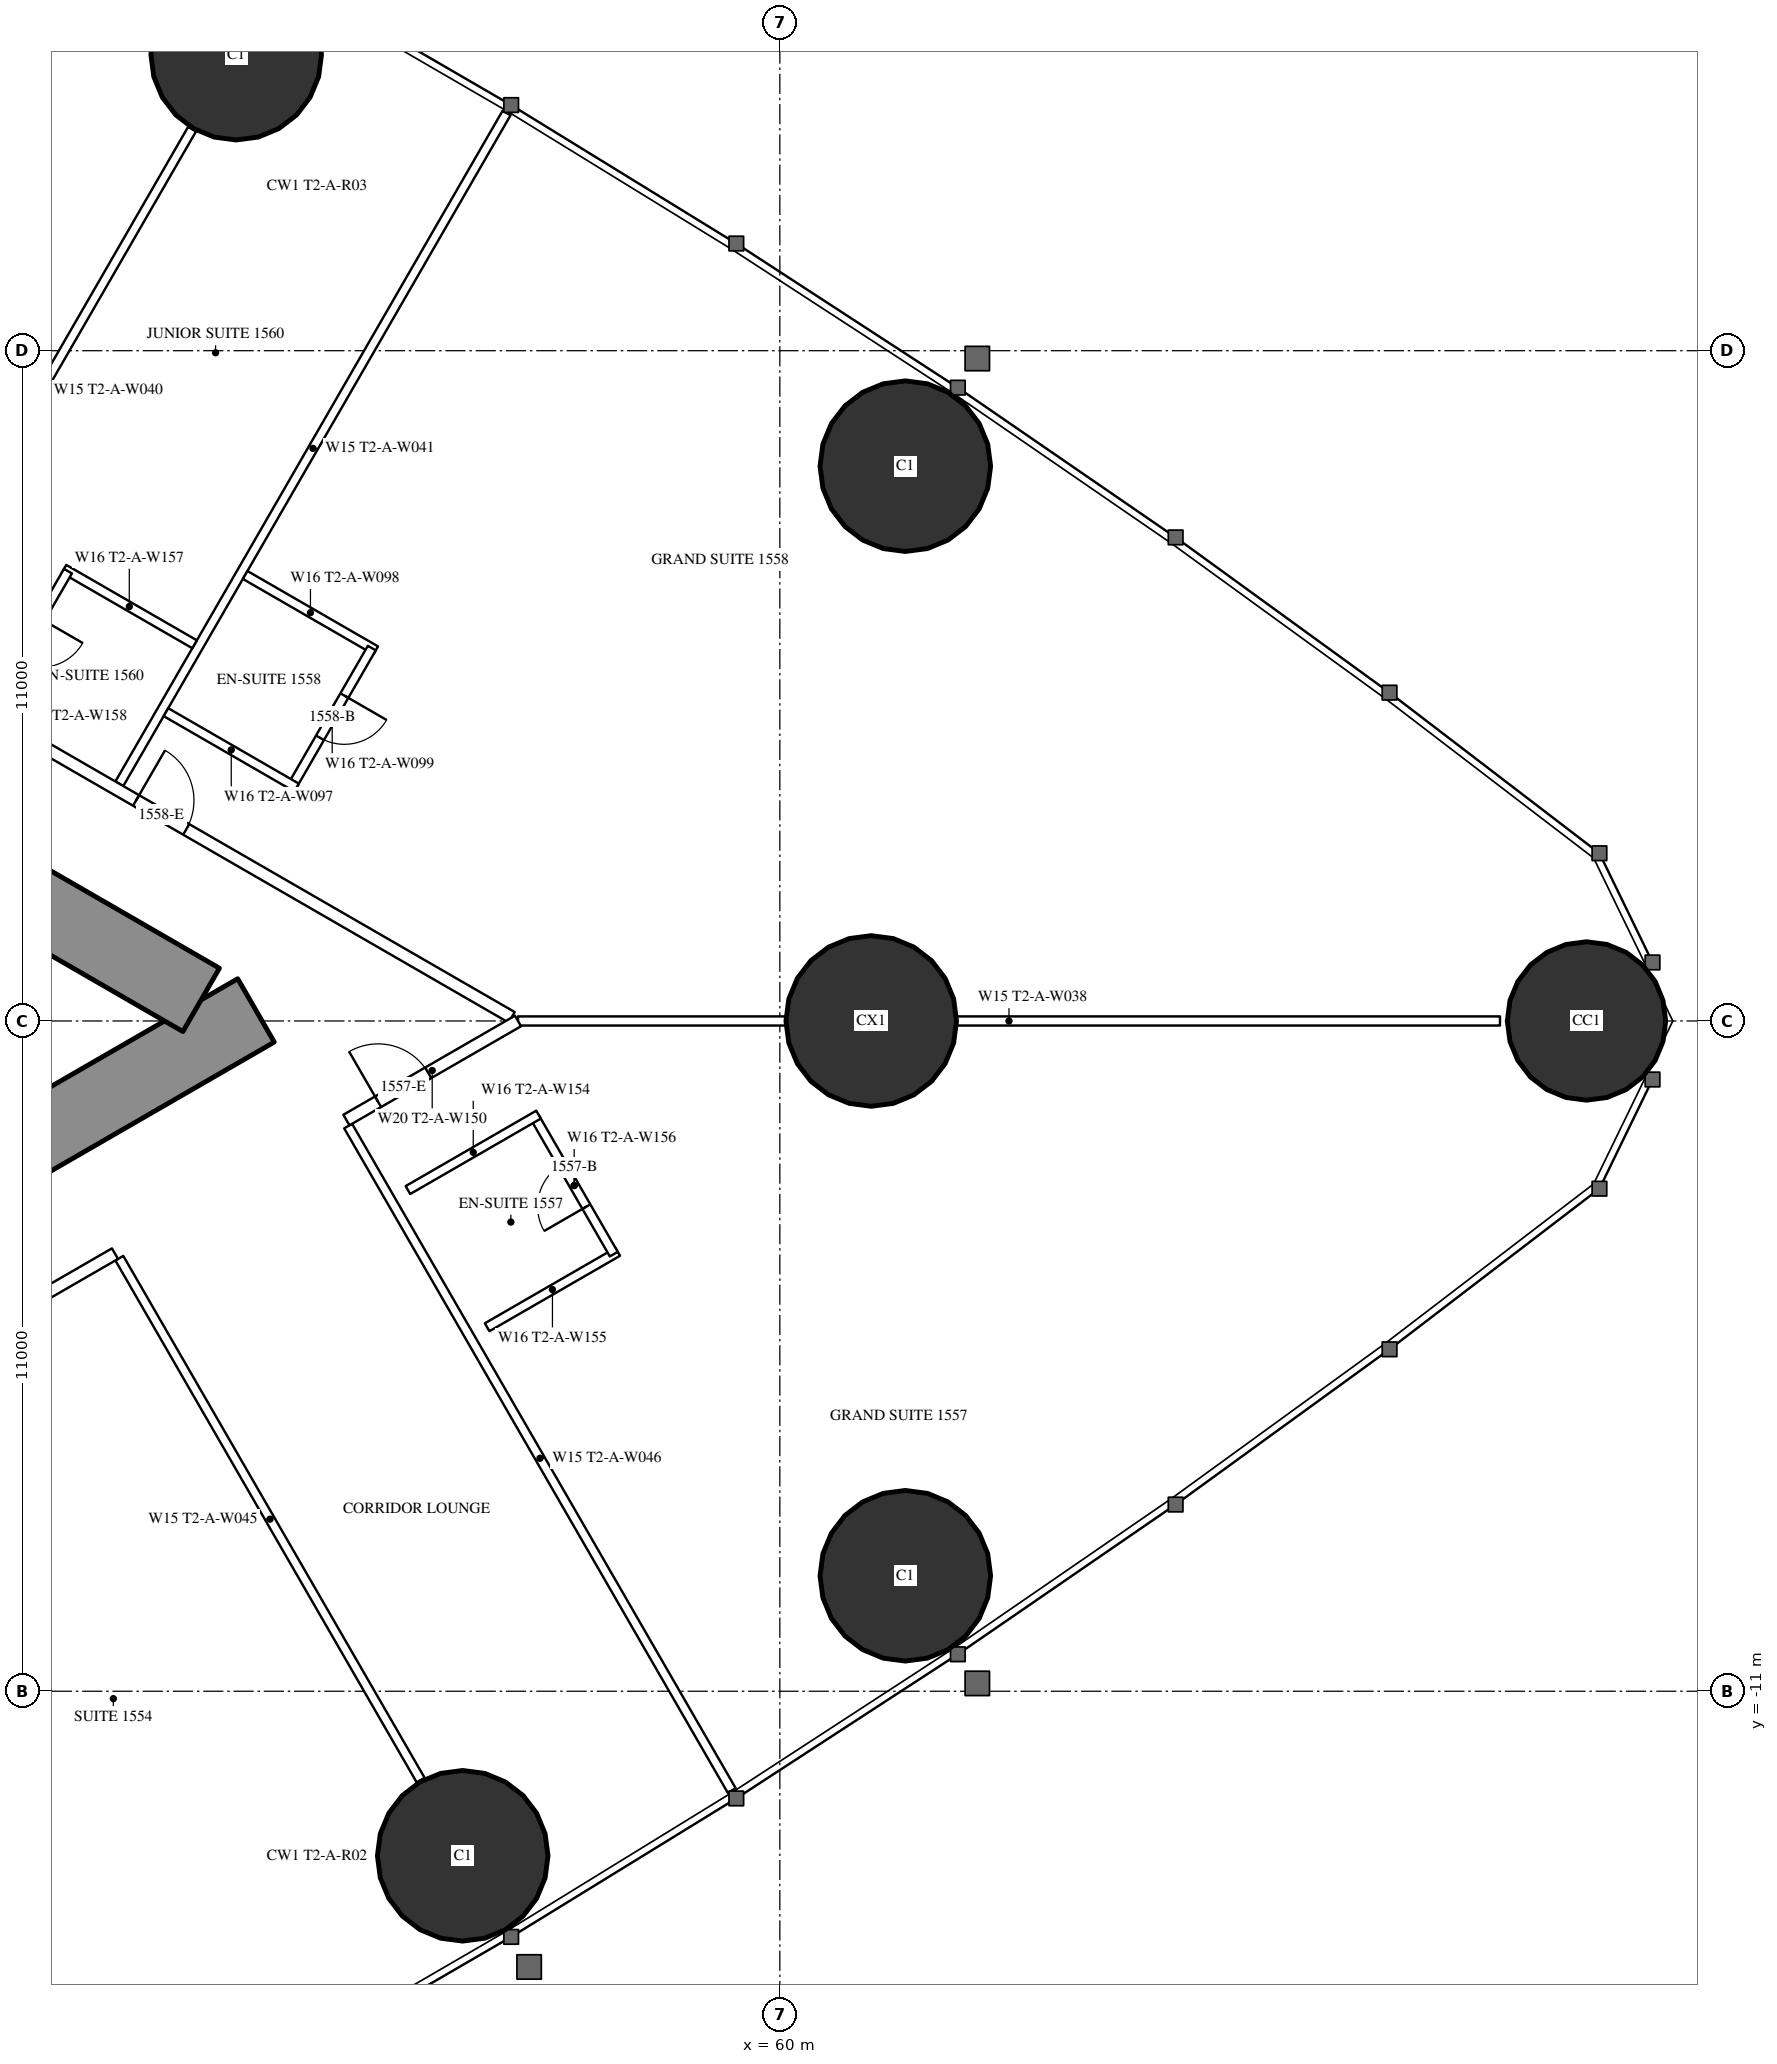
"""IFC4 building model, lengths in metres.
Left out: names, types, materials, properties, quantities, classifications, styles, units other than length and angle.
Written with IfcOpenShell. Run it as: python <this file> out.ifc"""

import sys

from ifc_helpers import new_model, si_unit, direction, frame, frame_2d, origin, origin_2d, place, context, subcontext, project, spatial, rectangle, hollow_circle, extrude, element, fill, save


model = new_model("IFC4")
c1 = context("Model", 3, precision=1e-05, world=origin(), true_north=direction((0.0, 1.0)))
c2 = subcontext(c1, "Body", "Model", "MODEL_VIEW")
j1 = project(units=[si_unit("LENGTHUNIT", "METRE"), si_unit("PLANEANGLEUNIT", "RADIAN")], contexts=[c1])
p1 = place(None, origin())
s1 = spatial("IfcSite", under=j1, at=p1, CompositionType="ELEMENT")
p2 = place(p1, origin())
s2 = spatial("IfcBuilding", under=s1, at=p2, CompositionType="ELEMENT")
p3 = place(p2, frame((0.0, 0.0, 60.0)))
s3 = spatial("IfcBuildingStorey", under=s2, at=p3, CompositionType="ELEMENT", Elevation=60.0)
p4 = place(p3, frame((73.239, 0.0, 0.0), z_axis=(0.0, 0.0, 1.0), x_axis=(1.0, 0.0, 0.0)))
e1 = element("IfcColumn", 1, at=p4, inside=s3, PredefinedType="COLUMN", context=c2, shape_type="SweptSolid", body=[
    extrude(hollow_circle(Radius=1.3, WallThickness=0.1, at=origin_2d()), origin(), (0.0, 0.0, 1.0), 3.5),
])
for number, where, z_axis, x_axis in (
    (2, (62.059, 9.105, 0.0), (0.0, 0.0, 1.0), (1.0, 0.0, 0.0)),
    (3, (51.078, 15.858, 0.0), (0.0, 0.0, 1.0), (1.0, 0.0, 0.0)),
    (4, (54.795, -13.701, 0.0), (0.0, 0.0, 1.0), (1.0, 0.0, 0.0)),
    (5, (62.059, -9.105, 0.0), (0.0, 0.0, 1.0), (1.0, 0.0, 0.0)),
):
    element("IfcColumn", number, at=place(p3, frame(where, z_axis=z_axis, x_axis=x_axis)), inside=s3, PredefinedType="COLUMN", context=c2, shape_type="SweptSolid", body=[
        extrude(hollow_circle(Radius=1.4, WallThickness=0.12, at=origin_2d()), origin(), (0.0, 0.0, 1.0), 3.5),
    ])
p5 = place(p3, frame((61.5, 0.0, 0.0), z_axis=(0.0, 0.0, 1.0), x_axis=(1.0, 0.0, 0.0)))
e6 = element("IfcColumn", 6, at=p5, inside=s3, PredefinedType="COLUMN", context=c2, shape_type="SweptSolid", body=[
    extrude(hollow_circle(Radius=1.4, WallThickness=0.1, at=origin_2d()), origin(), (0.0, 0.0, 1.0), 3.5),
])
p6 = place(p3, frame((27.2, -13.8, 0.0), z_axis=(0.0, 0.0, 1.0), x_axis=(0.866027159892, 0.499996958321, 0.0)))
e7 = element("IfcWall", 7, at=p6, inside=s3, PredefinedType="SHEAR", context=c2, shape_type="SweptSolid", body=[
    extrude(rectangle(XDim=27.947, YDim=1.2, at=frame_2d((13.973, 0.0))), origin(), (0.0, 0.0, 1.0), 3.5),
])
p7 = place(p6, frame((4.6, 0.0, 0.0)))
e8 = element("IfcOpeningElement", 8, at=p7, cuts=e7, PredefinedType="OPENING", context=c2, shape_type="SweptSolid", body=[
    extrude(rectangle(XDim=1.0, YDim=2.2, at=frame_2d((0.5, 1.1))), frame((0.0, 0.61, 0.0), z_axis=(0.0, -1.0, 0.0), x_axis=(1.0, 0.0, 0.0)), (0.0, 0.0, 1.0), 1.22),
])
p8 = place(p6, frame((13.395, 0.0, 0.0)))
e9 = element("IfcOpeningElement", 9, at=p8, cuts=e7, PredefinedType="OPENING", context=c2, shape_type="SweptSolid", body=[
    extrude(rectangle(XDim=1.8, YDim=2.2, at=frame_2d((0.9, 1.1))), frame((0.0, 0.61, 0.0), z_axis=(0.0, -1.0, 0.0), x_axis=(1.0, 0.0, 0.0)), (0.0, 0.0, 1.0), 1.22),
])
p9 = place(p3, frame((27.2, 13.8, 0.0), z_axis=(0.0, 0.0, 1.0), x_axis=(0.866024515034, -0.500001539357, 0.0)))
e10 = element("IfcWall", 10, at=p9, inside=s3, PredefinedType="SHEAR", context=c2, shape_type="SweptSolid", body=[
    extrude(rectangle(XDim=26.907, YDim=1.2, at=frame_2d((13.454, 0.0))), origin(), (0.0, 0.0, 1.0), 3.5),
])
p10 = place(p9, frame((4.6, 0.0, 0.0)))
e11 = element("IfcOpeningElement", 11, at=p10, cuts=e10, PredefinedType="OPENING", context=c2, shape_type="SweptSolid", body=[
    extrude(rectangle(XDim=1.0, YDim=2.2, at=frame_2d((0.5, 1.1))), frame((0.0, 0.61, 0.0), z_axis=(0.0, -1.0, 0.0), x_axis=(1.0, 0.0, 0.0)), (0.0, 0.0, 1.0), 1.22),
])
p11 = place(p9, frame((13.395, 0.0, 0.0)))
e12 = element("IfcOpeningElement", 12, at=p11, cuts=e10, PredefinedType="OPENING", context=c2, shape_type="SweptSolid", body=[
    extrude(rectangle(XDim=1.8, YDim=2.2, at=frame_2d((0.9, 1.1))), frame((0.0, 0.61, 0.0), z_axis=(0.0, -1.0, 0.0), x_axis=(1.0, 0.0, 0.0)), (0.0, 0.0, 1.0), 1.22),
])
p12 = place(p3, frame((49.159, -3.893, 0.0), z_axis=(0.0, 0.0, 1.0), x_axis=(0.499998773722, -0.866026111775, 0.0)))
e13 = element("IfcWall", 13, at=p12, inside=s3, PredefinedType="PARTITIONING", context=c2, shape_type="SweptSolid", body=[
    extrude(rectangle(XDim=9.892, YDim=0.15, at=frame_2d((4.946, 0.0))), origin(), (0.0, 0.0, 1.0), 2.25),
])
p13 = place(p3, frame((52.915, -1.725, 0.0), z_axis=(0.0, 0.0, 1.0), x_axis=(0.499997163113, -0.866027041656, 0.0)))
e14 = element("IfcWall", 14, at=p13, inside=s3, PredefinedType="PARTITIONING", context=c2, shape_type="SweptSolid", body=[
    extrude(rectangle(XDim=12.591, YDim=0.15, at=frame_2d((6.295, 0.0))), origin(), (0.0, 0.0, 1.0), 3.25),
])
p14 = place(p3, frame((45.403, 6.062, 0.0), z_axis=(0.0, 0.0, 1.0), x_axis=(0.500013434677, 0.866017647131, 0.0)))
e15 = element("IfcWall", 15, at=p14, inside=s3, PredefinedType="PARTITIONING", context=c2, shape_type="SweptSolid", body=[
    extrude(rectangle(XDim=9.902, YDim=0.15, at=frame_2d((4.951, 0.0))), origin(), (0.0, 0.0, 1.0), 2.25),
])
p15 = place(p3, frame((49.159, 3.893, 0.0), z_axis=(0.0, 0.0, 1.0), x_axis=(0.499995664361, 0.866027906952, 0.0)))
e16 = element("IfcWall", 16, at=p15, inside=s3, PredefinedType="PARTITIONING", context=c2, shape_type="SweptSolid", body=[
    extrude(rectangle(XDim=12.711, YDim=0.15, at=frame_2d((6.356, 0.0))), origin(), (0.0, 0.0, 1.0), 3.25),
])
p16 = place(p3, frame((55.702, 0.0, 0.0), z_axis=(0.0, 0.0, 1.0), x_axis=(1.0, 0.0, 0.0)))
e17 = element("IfcWall", 17, at=p16, inside=s3, PredefinedType="PARTITIONING", context=c2, shape_type="SweptSolid", body=[
    extrude(rectangle(XDim=16.117, YDim=0.15, at=frame_2d((8.059, 0.0))), origin(), (0.0, 0.0, 1.0), 2.25),
])
p17 = place(p3, frame((36.834, 10.894, 0.0), z_axis=(0.0, 0.0, 1.0), x_axis=(0.866028157229, -0.499995230863, 0.0)))
e18 = element("IfcWall", 18, at=p17, inside=s3, PredefinedType="PARTITIONING", context=c2, shape_type="SweptSolid", body=[
    extrude(rectangle(XDim=21.667, YDim=0.2, at=frame_2d((10.833, 0.0))), origin(), (0.0, 0.0, 1.0), 3.25),
])
p18 = place(p17, frame((14.55, 0.0, 0.0)))
e19 = element("IfcOpeningElement", 19, at=p18, cuts=e18, PredefinedType="OPENING", context=c2, shape_type="SweptSolid", body=[
    extrude(rectangle(XDim=0.95, YDim=2.2, at=frame_2d((0.475, 1.1))), frame((0.0, 0.11, 0.0), z_axis=(0.0, -1.0, 0.0), x_axis=(1.0, 0.0, 0.0)), (0.0, 0.0, 1.0), 0.22),
])
p19 = place(p17, frame((10.5, 0.0, 0.0)))
e20 = element("IfcOpeningElement", 20, at=p19, cuts=e18, PredefinedType="OPENING", context=c2, shape_type="SweptSolid", body=[
    extrude(rectangle(XDim=0.95, YDim=2.2, at=frame_2d((0.475, 1.1))), frame((0.0, 0.11, 0.0), z_axis=(0.0, -1.0, 0.0), x_axis=(1.0, 0.0, 0.0)), (0.0, 0.0, 1.0), 0.22),
])
p20 = place(p17, frame((4.292, 0.0, 0.0)))
e21 = element("IfcOpeningElement", 21, at=p20, cuts=e18, PredefinedType="OPENING", context=c2, shape_type="SweptSolid", body=[
    extrude(rectangle(XDim=1.0, YDim=2.2, at=frame_2d((0.5, 1.1))), frame((0.0, 0.11, 0.0), z_axis=(0.0, -1.0, 0.0), x_axis=(1.0, 0.0, 0.0)), (0.0, 0.0, 1.0), 0.22),
])
p21 = place(p17, frame((0.246, 0.0, 0.0)))
e22 = element("IfcOpeningElement", 22, at=p21, cuts=e18, PredefinedType="OPENING", context=c2, shape_type="SweptSolid", body=[
    extrude(rectangle(XDim=0.9, YDim=2.2, at=frame_2d((0.45, 1.1))), frame((0.0, 0.11, 0.0), z_axis=(0.0, -1.0, 0.0), x_axis=(1.0, 0.0, 0.0)), (0.0, 0.0, 1.0), 0.22),
])
p22 = place(p3, frame((37.96, -10.243, 0.0), z_axis=(0.0, 0.0, 1.0), x_axis=(0.866030548046, 0.499991089772, 0.0)))
e23 = element("IfcWall", 23, at=p22, inside=s3, PredefinedType="PARTITIONING", context=c2, shape_type="SweptSolid", body=[
    extrude(rectangle(XDim=12.849, YDim=0.2, at=frame_2d((6.425, 0.0))), origin(), (0.0, 0.0, 1.0), 3.25),
])
p23 = place(p22, frame((4.575, 0.0, 0.0)))
e24 = element("IfcOpeningElement", 24, at=p23, cuts=e23, PredefinedType="OPENING", context=c2, shape_type="SweptSolid", body=[
    extrude(rectangle(XDim=0.95, YDim=2.2, at=frame_2d((0.475, 1.1))), frame((0.0, 0.11, 0.0), z_axis=(0.0, -1.0, 0.0), x_axis=(1.0, 0.0, 0.0)), (0.0, 0.0, 1.0), 0.22),
])
p24 = place(p22, frame((0.6, 0.0, 0.0)))
e25 = element("IfcOpeningElement", 25, at=p24, cuts=e23, PredefinedType="OPENING", context=c2, shape_type="SweptSolid", body=[
    extrude(rectangle(XDim=0.95, YDim=2.2, at=frame_2d((0.475, 1.1))), frame((0.0, 0.11, 0.0), z_axis=(0.0, -1.0, 0.0), x_axis=(1.0, 0.0, 0.0)), (0.0, 0.0, 1.0), 0.22),
])
p25 = place(p3, frame((52.886, -1.626, 0.0), z_axis=(0.0, 0.0, 1.0), x_axis=(0.866030540913, 0.499991102127, 0.0)))
e26 = element("IfcWall", 26, at=p25, inside=s3, PredefinedType="PARTITIONING", context=c2, shape_type="SweptSolid", body=[
    extrude(rectangle(XDim=3.251, YDim=0.2, at=frame_2d((1.626, 0.0))), origin(), (0.0, 0.0, 1.0), 3.25),
])
p26 = place(p25, frame((0.6, 0.0, 0.0)))
e27 = element("IfcOpeningElement", 27, at=p26, cuts=e26, PredefinedType="OPENING", context=c2, shape_type="SweptSolid", body=[
    extrude(rectangle(XDim=0.95, YDim=2.2, at=frame_2d((0.475, 1.1))), frame((0.0, 0.11, 0.0), z_axis=(0.0, -1.0, 0.0), x_axis=(1.0, 0.0, 0.0)), (0.0, 0.0, 1.0), 0.22),
])
p27 = place(p3, frame((55.196, -5.026, 0.0), z_axis=(0.0, 0.0, 1.0), x_axis=(0.866073894602, 0.499916002032, 0.0)))
e28 = element("IfcWall", 28, at=p27, inside=s3, PredefinedType="PARTITIONING", context=c2, shape_type="SweptSolid", body=[
    extrude(rectangle(XDim=2.475, YDim=0.15, at=frame_2d((1.238, 0.0))), origin(), (0.0, 0.0, 1.0), 3.25),
])
p28 = place(p3, frame((55.975, -1.575, 0.0), z_axis=(0.0, 0.0, 1.0), x_axis=(0.500006934395, -0.866021400173, 0.0)))
e29 = element("IfcWall", 29, at=p28, inside=s3, PredefinedType="PARTITIONING", context=c2, shape_type="SweptSolid", body=[
    extrude(rectangle(XDim=2.6, YDim=0.15, at=frame_2d((1.3, 0.0))), origin(), (0.0, 0.0, 1.0), 3.25),
])
p29 = place(p28, frame((0.9, 0.0, 0.0)))
e30 = element("IfcOpeningElement", 30, at=p29, cuts=e29, PredefinedType="OPENING", context=c2, shape_type="SweptSolid", body=[
    extrude(rectangle(XDim=0.8, YDim=2.2, at=frame_2d((0.4, 1.1))), frame((0.0, 0.085, 0.0), z_axis=(0.0, -1.0, 0.0), x_axis=(1.0, 0.0, 0.0)), (0.0, 0.0, 1.0), 0.17),
])
p30 = place(p3, frame((53.896, -2.775, 0.0), z_axis=(0.0, 0.0, 1.0), x_axis=(0.866006523861, 0.500032699561, 0.0)))
e31 = element("IfcWall", 31, at=p30, inside=s3, PredefinedType="PARTITIONING", context=c2, shape_type="SweptSolid", body=[
    extrude(rectangle(XDim=2.475, YDim=0.15, at=frame_2d((1.237, 0.0))), origin(), (0.0, 0.0, 1.0), 3.25),
])
p31 = place(p3, frame((51.224, 7.32, 0.0), z_axis=(0.0, 0.0, 1.0), x_axis=(0.866031185235, -0.4999899861, 0.0)))
e32 = element("IfcWall", 32, at=p31, inside=s3, PredefinedType="PARTITIONING", context=c2, shape_type="SweptSolid", body=[
    extrude(rectangle(XDim=2.475, YDim=0.15, at=frame_2d((1.238, 0.0))), origin(), (0.0, 0.0, 1.0), 3.25),
])
p32 = place(p3, frame((52.003, 3.868, 0.0), z_axis=(0.0, 0.0, 1.0), x_axis=(0.500047596559, 0.865997922154, 0.0)))
e33 = element("IfcWall", 33, at=p32, inside=s3, PredefinedType="PARTITIONING", context=c2, shape_type="SweptSolid", body=[
    extrude(rectangle(XDim=2.6, YDim=0.15, at=frame_2d((1.3, 0.0))), origin(), (0.0, 0.0, 1.0), 3.25),
])
p33 = place(p32, frame((0.9, 0.0, 0.0)))
e34 = element("IfcOpeningElement", 34, at=p33, cuts=e33, PredefinedType="OPENING", context=c2, shape_type="SweptSolid", body=[
    extrude(rectangle(XDim=0.8, YDim=2.2, at=frame_2d((0.4, 1.1))), frame((0.0, 0.085, 0.0), z_axis=(0.0, -1.0, 0.0), x_axis=(1.0, 0.0, 0.0)), (0.0, 0.0, 1.0), 0.17),
])
for number, where, z_axis, x_axis in (
    (35, (49.925, 5.068, 0.0), (0.0, 0.0, 1.0), (0.866, -0.5, 0.0)),
    (36, (48.251, 7.42, 0.0), (0.0, 0.0, 1.0), (0.866, -0.5, 0.0)),
):
    element("IfcWall", number, at=place(p3, frame(where, z_axis=z_axis, x_axis=x_axis)), inside=s3, PredefinedType="PARTITIONING", context=c2, shape_type="SweptSolid", body=[
        extrude(rectangle(XDim=2.475, YDim=0.15, at=frame_2d((1.237, 0.0))), origin(), (0.0, 0.0, 1.0), 3.25),
    ])
p34 = place(p3, frame((47.016, 5.13, 0.0), z_axis=(0.0, 0.0, 1.0), x_axis=(0.500006934395, 0.866021400173, 0.0)))
e37 = element("IfcWall", 37, at=p34, inside=s3, PredefinedType="PARTITIONING", context=c2, shape_type="SweptSolid", body=[
    extrude(rectangle(XDim=2.6, YDim=0.15, at=frame_2d((1.3, 0.0))), origin(), (0.0, 0.0, 1.0), 3.25),
])
p35 = place(p34, frame((0.9, 0.0, 0.0)))
e38 = element("IfcOpeningElement", 38, at=p35, cuts=e37, PredefinedType="OPENING", context=c2, shape_type="SweptSolid", body=[
    extrude(rectangle(XDim=0.8, YDim=2.2, at=frame_2d((0.4, 1.1))), frame((0.0, 0.085, 0.0), z_axis=(0.0, -1.0, 0.0), x_axis=(1.0, 0.0, 0.0)), (0.0, 0.0, 1.0), 0.17),
])
p36 = place(p29, origin())
e39 = element("IfcDoor", 39, at=p36, inside=s3, OperationType="SINGLE_SWING_RIGHT", PredefinedType="DOOR", context=c2, shape_type="SweptSolid", body=[
    extrude(rectangle(XDim=0.8, YDim=2.2, at=frame_2d((0.4, 1.1))), frame((0.0, 0.025, 0.0), z_axis=(0.0, -1.0, 0.0), x_axis=(1.0, 0.0, 0.0)), (0.0, 0.0, 1.0), 0.05),
])
fill(e30, e39)
p37 = place(p26, origin())
e40 = element("IfcDoor", 40, at=p37, inside=s3, OperationType="SINGLE_SWING_LEFT", PredefinedType="DOOR", context=c2, shape_type="SweptSolid", body=[
    extrude(rectangle(XDim=0.95, YDim=2.2, at=frame_2d((0.475, 1.1))), frame((0.0, 0.025, 0.0), z_axis=(0.0, -1.0, 0.0), x_axis=(1.0, 0.0, 0.0)), (0.0, 0.0, 1.0), 0.05),
])
fill(e27, e40)
p38 = place(p33, origin())
e41 = element("IfcDoor", 41, at=p38, inside=s3, OperationType="SINGLE_SWING_RIGHT", PredefinedType="DOOR", context=c2, shape_type="SweptSolid", body=[
    extrude(rectangle(XDim=0.8, YDim=2.2, at=frame_2d((0.4, 1.1))), frame((0.0, 0.025, 0.0), z_axis=(0.0, -1.0, 0.0), x_axis=(1.0, 0.0, 0.0)), (0.0, 0.0, 1.0), 0.05),
])
fill(e34, e41)
p39 = place(p18, origin())
e42 = element("IfcDoor", 42, at=p39, inside=s3, OperationType="SINGLE_SWING_LEFT", PredefinedType="DOOR", context=c2, shape_type="SweptSolid", body=[
    extrude(rectangle(XDim=0.95, YDim=2.2, at=frame_2d((0.475, 1.1))), frame((0.0, 0.025, 0.0), z_axis=(0.0, -1.0, 0.0), x_axis=(1.0, 0.0, 0.0)), (0.0, 0.0, 1.0), 0.05),
])
fill(e19, e42)
save(model, sys.argv[1])
